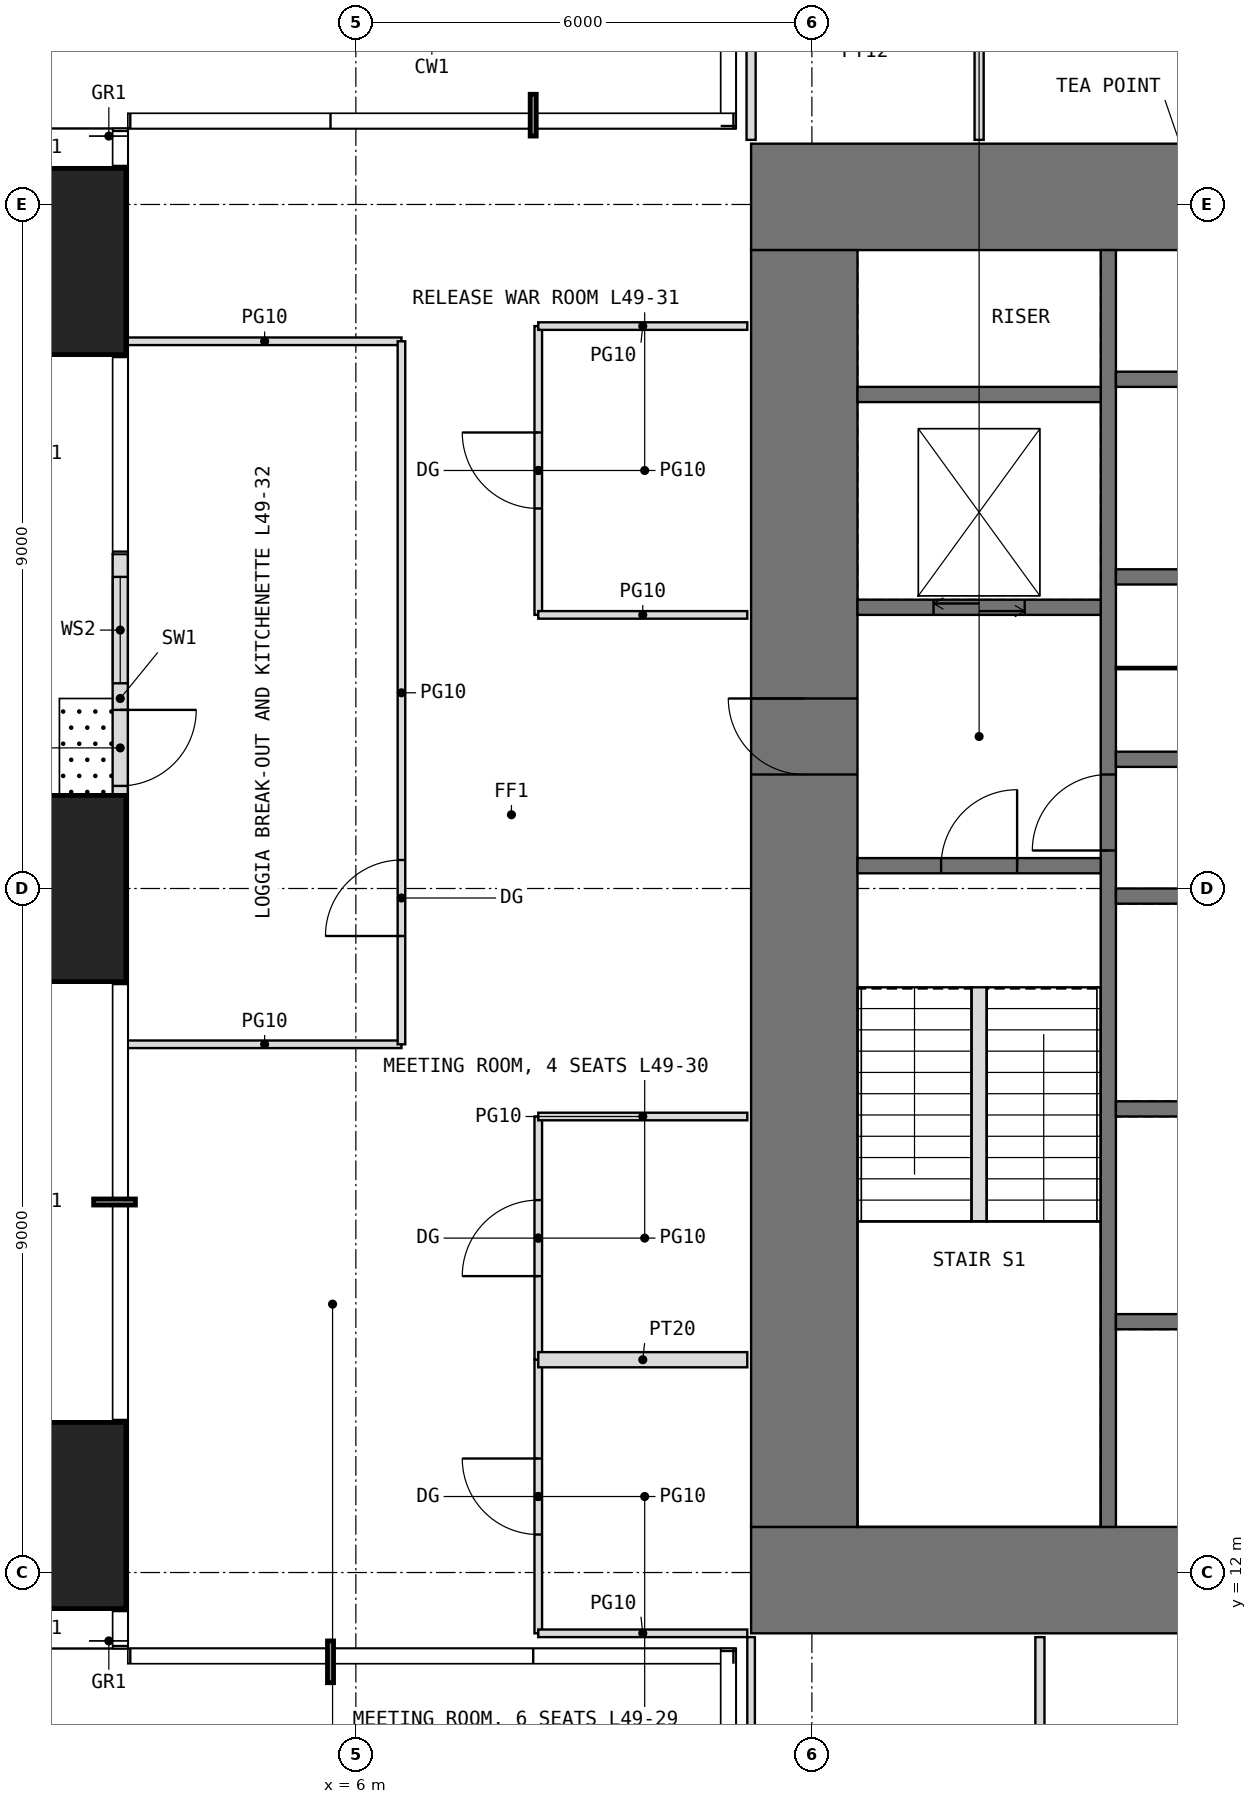
"""IFC4 building model, lengths in metres.
Left out: names, types, materials, properties, quantities, classifications, styles, units other than length and angle.
Written with IfcOpenShell. Run it as: python <this file> out.ifc"""

import sys

from ifc_helpers import new_model, si_unit, direction, frame, frame_2d, origin, origin_2d, place, context, subcontext, project, spatial, rectangle, extrude, element, fill, save


model = new_model("IFC4")
c1 = context("Model", 3, precision=1e-05, world=origin(), true_north=direction((0.0, 1.0)))
c2 = subcontext(c1, "Body", "Model", "MODEL_VIEW")
j1 = project(units=[si_unit("LENGTHUNIT", "METRE"), si_unit("PLANEANGLEUNIT", "RADIAN")], contexts=[c1])
p1 = place(None, origin())
s1 = spatial("IfcSite", under=j1, at=p1, CompositionType="ELEMENT")
p2 = place(p1, origin())
s2 = spatial("IfcBuilding", under=s1, at=p2, CompositionType="ELEMENT")
p3 = place(p2, frame((0.0, 0.0, 206.5)))
s3 = spatial("IfcBuildingStorey", under=s2, at=p3, CompositionType="ELEMENT", Elevation=206.5)
for number, where, z_axis, x_axis in (
    (1, (1.75, 12.75, 0.0), (0.0, 0.0, 1.0), (1.0, 0.0, 0.0)),
    (2, (1.75, 21.0, 0.0), (0.0, 0.0, 1.0), (1.0, 0.0, 0.0)),
    (3, (1.75, 29.25, 0.0), (0.0, 0.0, 1.0), (1.0, 0.0, 0.0)),
):
    element("IfcColumn", number, at=place(p3, frame(where, z_axis=z_axis, x_axis=x_axis)), inside=s3, PredefinedType="COLUMN", context=c2, shape_type="SweptSolid", body=[
        extrude(rectangle(XDim=2.45, YDim=2.45, at=origin_2d()), origin(), (0.0, 0.0, 1.0), 4.0),
    ])
p4 = place(p3, frame((2.9, 25.4, 0.0), z_axis=(0.0, 0.0, 1.0), x_axis=(0.0, -1.0, 0.0)))
e4 = element("IfcWall", 4, at=p4, inside=s3, PredefinedType="USERDEFINED", context=c2, shape_type="SweptSolid", body=[
    extrude(rectangle(XDim=3.8, YDim=0.2, at=frame_2d((1.9, 0.0))), origin(), (0.0, 0.0, 1.0), 3.75),
])
p5 = place(p4, frame((2.05, 0.0, 0.0)))
e5 = element("IfcOpeningElement", 5, at=p5, cuts=e4, PredefinedType="OPENING", context=c2, shape_type="SweptSolid", body=[
    extrude(rectangle(XDim=1.0, YDim=2.4, at=frame_2d((0.5, 1.2))), frame((0.0, 0.11, 0.0), z_axis=(0.0, -1.0, 0.0), x_axis=(1.0, 0.0, 0.0)), (0.0, 0.0, 1.0), 0.22),
])
p6 = place(p4, frame((0.3, 0.0, 0.3)))
e6 = element("IfcOpeningElement", 6, at=p6, cuts=e4, PredefinedType="OPENING", context=c2, shape_type="SweptSolid", body=[
    extrude(rectangle(XDim=1.4, YDim=2.7, at=frame_2d((0.7, 1.35))), frame((0.0, 0.11, 0.0), z_axis=(0.0, -1.0, 0.0), x_axis=(1.0, 0.0, 0.0)), (0.0, 0.0, 1.0), 0.22),
])
p7 = place(p3, frame((11.2, 11.9, -0.05), z_axis=(0.0, 0.0, 1.0), x_axis=(1.0, 0.0, 0.0)))
e7 = element("IfcWall", 7, at=p7, inside=s3, PredefinedType="SHEAR", context=c2, shape_type="SweptSolid", body=[
    extrude(rectangle(XDim=19.6, YDim=1.4, at=frame_2d((9.8, 0.0))), origin(), (0.0, 0.0, 1.0), 4.0),
])
p8 = place(p7, frame((8.8, 0.0, 0.05)))
e8 = element("IfcOpeningElement", 8, at=p8, cuts=e7, PredefinedType="OPENING", context=c2, shape_type="SweptSolid", body=[
    extrude(rectangle(XDim=2.0, YDim=2.2, at=frame_2d((1.0, 1.1))), frame((0.0, 0.71, 0.0), z_axis=(0.0, -1.0, 0.0), x_axis=(1.0, 0.0, 0.0)), (0.0, 0.0, 1.0), 1.42),
])
p9 = place(p3, frame((11.2, 30.1, -0.05), z_axis=(0.0, 0.0, 1.0), x_axis=(1.0, 0.0, 0.0)))
e9 = element("IfcWall", 9, at=p9, inside=s3, PredefinedType="SHEAR", context=c2, shape_type="SweptSolid", body=[
    extrude(rectangle(XDim=19.6, YDim=1.4, at=frame_2d((9.8, 0.0))), origin(), (0.0, 0.0, 1.0), 4.0),
])
p10 = place(p9, frame((8.8, 0.0, 0.05)))
e10 = element("IfcOpeningElement", 10, at=p10, cuts=e9, PredefinedType="OPENING", context=c2, shape_type="SweptSolid", body=[
    extrude(rectangle(XDim=2.0, YDim=2.2, at=frame_2d((1.0, 1.1))), frame((0.0, 0.71, 0.0), z_axis=(0.0, -1.0, 0.0), x_axis=(1.0, 0.0, 0.0)), (0.0, 0.0, 1.0), 1.42),
])
p11 = place(p3, frame((11.9, 12.6, -0.05), z_axis=(0.0, 0.0, 1.0), x_axis=(0.0, 1.0, 0.0)))
e11 = element("IfcWall", 11, at=p11, inside=s3, PredefinedType="SHEAR", context=c2, shape_type="SweptSolid", body=[
    extrude(rectangle(XDim=16.8, YDim=1.4, at=frame_2d((8.4, 0.0))), origin(), (0.0, 0.0, 1.0), 4.0),
])
p12 = place(p11, frame((9.9, 0.0, 0.05)))
e12 = element("IfcOpeningElement", 12, at=p12, cuts=e11, PredefinedType="OPENING", context=c2, shape_type="SweptSolid", body=[
    extrude(rectangle(XDim=1.0, YDim=2.2, at=frame_2d((0.5, 1.1))), frame((0.0, 0.71, 0.0), z_axis=(0.0, -1.0, 0.0), x_axis=(1.0, 0.0, 0.0)), (0.0, 0.0, 1.0), 1.42),
])
p13 = place(p3, frame((15.9, 12.6, -0.05), z_axis=(0.0, 0.0, 1.0), x_axis=(0.0, 1.0, 0.0)))
e13 = element("IfcWall", 13, at=p13, inside=s3, PredefinedType="SHEAR", context=c2, shape_type="SweptSolid", body=[
    extrude(rectangle(XDim=16.8, YDim=0.2, at=frame_2d((8.4, 0.0))), origin(), (0.0, 0.0, 1.0), 4.0),
])
p14 = place(p13, frame((8.9, 0.0, 0.05)))
e14 = element("IfcOpeningElement", 14, at=p14, cuts=e13, PredefinedType="OPENING", context=c2, shape_type="SweptSolid", body=[
    extrude(rectangle(XDim=1.0, YDim=2.2, at=frame_2d((0.5, 1.1))), frame((0.0, 0.11, 0.0), z_axis=(0.0, -1.0, 0.0), x_axis=(1.0, 0.0, 0.0)), (0.0, 0.0, 1.0), 0.22),
])
p15 = place(p3, frame((12.6, 21.3, -0.05), z_axis=(0.0, 0.0, 1.0), x_axis=(1.0, 0.0, 0.0)))
e15 = element("IfcWall", 15, at=p15, inside=s3, PredefinedType="SHEAR", context=c2, shape_type="SweptSolid", body=[
    extrude(rectangle(XDim=3.2, YDim=0.2, at=frame_2d((1.6, 0.0))), origin(), (0.0, 0.0, 1.0), 4.0),
])
p16 = place(p15, frame((1.1, 0.0, 0.05)))
e16 = element("IfcOpeningElement", 16, at=p16, cuts=e15, PredefinedType="OPENING", context=c2, shape_type="SweptSolid", body=[
    extrude(rectangle(XDim=1.0, YDim=2.2, at=frame_2d((0.5, 1.1))), frame((0.0, 0.11, 0.0), z_axis=(0.0, -1.0, 0.0), x_axis=(1.0, 0.0, 0.0)), (0.0, 0.0, 1.0), 0.22),
])
p17 = place(p3, frame((12.6, 24.7, -0.05), z_axis=(0.0, 0.0, 1.0), x_axis=(1.0, 0.0, 0.0)))
e17 = element("IfcWall", 17, at=p17, inside=s3, PredefinedType="SHEAR", context=c2, shape_type="SweptSolid", body=[
    extrude(rectangle(XDim=3.2, YDim=0.2, at=frame_2d((1.6, 0.0))), origin(), (0.0, 0.0, 1.0), 4.0),
])
p18 = place(p17, frame((1.0, 0.0, 0.05)))
e18 = element("IfcOpeningElement", 18, at=p18, cuts=e17, PredefinedType="OPENING", context=c2, shape_type="SweptSolid", body=[
    extrude(rectangle(XDim=1.2, YDim=2.2, at=frame_2d((0.6, 1.1))), frame((0.0, 0.11, 0.0), z_axis=(0.0, -1.0, 0.0), x_axis=(1.0, 0.0, 0.0)), (0.0, 0.0, 1.0), 0.22),
])
for number, where, z_axis, x_axis in (
    (19, (12.6, 27.5, -0.05), (0.0, 0.0, 1.0), (1.0, 0.0, 0.0)),
    (20, (16.0, 15.3, -0.05), (0.0, 0.0, 1.0), (1.0, 0.0, 0.0)),
    (21, (16.0, 18.1, -0.05), (0.0, 0.0, 1.0), (1.0, 0.0, 0.0)),
    (22, (16.0, 20.9, -0.05), (0.0, 0.0, 1.0), (1.0, 0.0, 0.0)),
    (23, (16.0, 22.7, -0.05), (0.0, 0.0, 1.0), (1.0, 0.0, 0.0)),
    (24, (16.0, 25.1, -0.05), (0.0, 0.0, 1.0), (1.0, 0.0, 0.0)),
    (25, (16.0, 27.7, -0.05), (0.0, 0.0, 1.0), (1.0, 0.0, 0.0)),
):
    element("IfcWall", number, at=place(p3, frame(where, z_axis=z_axis, x_axis=x_axis)), inside=s3, PredefinedType="SHEAR", context=c2, shape_type="SweptSolid", body=[
        extrude(rectangle(XDim=3.2, YDim=0.2, at=frame_2d((1.6, 0.0))), origin(), (0.0, 0.0, 1.0), 4.0),
    ])
p19 = place(p3, frame((16.0, 23.9, 0.0), z_axis=(0.0, 0.0, 1.0), x_axis=(1.0, 0.0, 0.0)))
e26 = element("IfcWall", 26, at=p19, inside=s3, PredefinedType="PARTITIONING", context=c2, shape_type="SweptSolid", body=[
    extrude(rectangle(XDim=1.4, YDim=0.03, at=frame_2d((0.7, 0.0))), origin(), (0.0, 0.0, 1.0), 3.75),
])
for number, where, z_axis, x_axis in (
    (27, (3.0, 18.95, 0.0), (0.0, 0.0, 1.0), (1.0, 0.0, 0.0)),
    (28, (3.0, 28.2, 0.0), (0.0, 0.0, 1.0), (1.0, 0.0, 0.0)),
):
    element("IfcWall", number, at=place(p3, frame(where, z_axis=z_axis, x_axis=x_axis)), inside=s3, PredefinedType="PARTITIONING", context=c2, shape_type="SweptSolid", body=[
        extrude(rectangle(XDim=3.6, YDim=0.1, at=frame_2d((1.8, 0.0))), origin(), (0.0, 0.0, 1.0), 3.75),
    ])
p20 = place(p3, frame((6.6, 18.95, 0.0), z_axis=(0.0, 0.0, 1.0), x_axis=(0.0, 1.0, 0.0)))
e29 = element("IfcWall", 29, at=p20, inside=s3, PredefinedType="PARTITIONING", context=c2, shape_type="SweptSolid", body=[
    extrude(rectangle(XDim=9.25, YDim=0.1, at=frame_2d((4.625, 0.0))), origin(), (0.0, 0.0, 1.0), 3.75),
])
p21 = place(p20, frame((1.425, 0.0, 0.0)))
e30 = element("IfcOpeningElement", 30, at=p21, cuts=e29, PredefinedType="OPENING", context=c2, shape_type="SweptSolid", body=[
    extrude(rectangle(XDim=1.0, YDim=2.4, at=frame_2d((0.5, 1.2))), frame((0.0, 0.06, 0.0), z_axis=(0.0, -1.0, 0.0), x_axis=(1.0, 0.0, 0.0)), (0.0, 0.0, 1.0), 0.12),
])
p22 = place(p3, frame((8.4, 11.2, 0.0), z_axis=(0.0, 0.0, 1.0), x_axis=(0.0, 1.0, 0.0)))
e31 = element("IfcWall", 31, at=p22, inside=s3, PredefinedType="PARTITIONING", context=c2, shape_type="SweptSolid", body=[
    extrude(rectangle(XDim=3.6, YDim=0.1, at=frame_2d((1.8, 0.0))), origin(), (0.0, 0.0, 1.0), 3.75),
])
p23 = place(p22, frame((1.3, 0.0, 0.0)))
e32 = element("IfcOpeningElement", 32, at=p23, cuts=e31, PredefinedType="OPENING", context=c2, shape_type="SweptSolid", body=[
    extrude(rectangle(XDim=1.0, YDim=2.4, at=frame_2d((0.5, 1.2))), frame((0.0, 0.06, 0.0), z_axis=(0.0, -1.0, 0.0), x_axis=(1.0, 0.0, 0.0)), (0.0, 0.0, 1.0), 0.12),
])
p24 = place(p3, frame((8.4, 11.2, 0.0), z_axis=(0.0, 0.0, 1.0), x_axis=(1.0, 0.0, 0.0)))
e33 = element("IfcWall", 33, at=p24, inside=s3, PredefinedType="PARTITIONING", context=c2, shape_type="SweptSolid", body=[
    extrude(rectangle(XDim=2.75, YDim=0.1, at=frame_2d((1.375, 0.0))), origin(), (0.0, 0.0, 1.0), 3.75),
])
p25 = place(p3, frame((8.4, 14.8, 0.0), z_axis=(0.0, 0.0, 1.0), x_axis=(0.0, 1.0, 0.0)))
e34 = element("IfcWall", 34, at=p25, inside=s3, PredefinedType="PARTITIONING", context=c2, shape_type="SweptSolid", body=[
    extrude(rectangle(XDim=3.2, YDim=0.1, at=frame_2d((1.6, 0.0))), origin(), (0.0, 0.0, 1.0), 3.75),
])
p26 = place(p25, frame((1.1, 0.0, 0.0)))
e35 = element("IfcOpeningElement", 35, at=p26, cuts=e34, PredefinedType="OPENING", context=c2, shape_type="SweptSolid", body=[
    extrude(rectangle(XDim=1.0, YDim=2.4, at=frame_2d((0.5, 1.2))), frame((0.0, 0.06, 0.0), z_axis=(0.0, -1.0, 0.0), x_axis=(1.0, 0.0, 0.0)), (0.0, 0.0, 1.0), 0.12),
])
p27 = place(p3, frame((8.4, 14.8, 0.0), z_axis=(0.0, 0.0, 1.0), x_axis=(1.0, 0.0, 0.0)))
e36 = element("IfcWall", 36, at=p27, inside=s3, PredefinedType="PARTITIONING", context=c2, shape_type="SweptSolid", body=[
    extrude(rectangle(XDim=2.75, YDim=0.2, at=frame_2d((1.375, 0.0))), origin(), (0.0, 0.0, 1.0), 3.75),
])
p28 = place(p3, frame((8.4, 18.0, 0.0), z_axis=(0.0, 0.0, 1.0), x_axis=(1.0, 0.0, 0.0)))
e37 = element("IfcWall", 37, at=p28, inside=s3, PredefinedType="PARTITIONING", context=c2, shape_type="SweptSolid", body=[
    extrude(rectangle(XDim=2.75, YDim=0.1, at=frame_2d((1.375, 0.0))), origin(), (0.0, 0.0, 1.0), 3.75),
])
p29 = place(p3, frame((8.4, 24.6, 0.0), z_axis=(0.0, 0.0, 1.0), x_axis=(0.0, 1.0, 0.0)))
e38 = element("IfcWall", 38, at=p29, inside=s3, PredefinedType="PARTITIONING", context=c2, shape_type="SweptSolid", body=[
    extrude(rectangle(XDim=3.8, YDim=0.1, at=frame_2d((1.9, 0.0))), origin(), (0.0, 0.0, 1.0), 3.75),
])
p30 = place(p29, frame((1.4, 0.0, 0.0)))
e39 = element("IfcOpeningElement", 39, at=p30, cuts=e38, PredefinedType="OPENING", context=c2, shape_type="SweptSolid", body=[
    extrude(rectangle(XDim=1.0, YDim=2.4, at=frame_2d((0.5, 1.2))), frame((0.0, 0.06, 0.0), z_axis=(0.0, -1.0, 0.0), x_axis=(1.0, 0.0, 0.0)), (0.0, 0.0, 1.0), 0.12),
])
for number, where, z_axis, x_axis in (
    (40, (8.4, 24.6, 0.0), (0.0, 0.0, 1.0), (1.0, 0.0, 0.0)),
    (41, (8.4, 28.4, 0.0), (0.0, 0.0, 1.0), (1.0, 0.0, 0.0)),
):
    element("IfcWall", number, at=place(p3, frame(where, z_axis=z_axis, x_axis=x_axis)), inside=s3, PredefinedType="PARTITIONING", context=c2, shape_type="SweptSolid", body=[
        extrude(rectangle(XDim=2.75, YDim=0.1, at=frame_2d((1.375, 0.0))), origin(), (0.0, 0.0, 1.0), 3.75),
    ])
p31 = place(p3, frame((11.2, 6.8, 0.0), z_axis=(0.0, 0.0, 1.0), x_axis=(0.0, 1.0, 0.0)))
e42 = element("IfcWall", 42, at=p31, inside=s3, PredefinedType="PARTITIONING", context=c2, shape_type="SweptSolid", body=[
    extrude(rectangle(XDim=4.35, YDim=0.1, at=frame_2d((2.175, 0.0))), origin(), (0.0, 0.0, 1.0), 3.75),
])
for number, where, z_axis, x_axis in (
    (43, (11.2, 30.85, 0.0), (0.0, 0.0, 1.0), (0.0, 1.0, 0.0)),
    (44, (14.2, 30.85, 0.0), (0.0, 0.0, 1.0), (0.0, 1.0, 0.0)),
):
    element("IfcWall", number, at=place(p3, frame(where, z_axis=z_axis, x_axis=x_axis)), inside=s3, PredefinedType="PARTITIONING", context=c2, shape_type="SweptSolid", body=[
        extrude(rectangle(XDim=3.05, YDim=0.12, at=frame_2d((1.525, 0.0))), origin(), (0.0, 0.0, 1.0), 3.75),
    ])
p32 = place(p3, frame((15.0, 6.8, 0.0), z_axis=(0.0, 0.0, 1.0), x_axis=(0.0, 1.0, 0.0)))
e45 = element("IfcWall", 45, at=p32, inside=s3, PredefinedType="PARTITIONING", context=c2, shape_type="SweptSolid", body=[
    extrude(rectangle(XDim=4.35, YDim=0.12, at=frame_2d((2.175, 0.0))), origin(), (0.0, 0.0, 1.0), 3.75),
])
p33 = place(p3, frame((14.2, 16.62, 0.0), z_axis=(0.0, 0.0, 1.0), x_axis=(0.0, 1.0, 0.0)))
e46 = element("IfcWall", 46, at=p33, inside=s3, PredefinedType="PARTITIONING", context=c2, shape_type="SweptSolid", body=[
    extrude(rectangle(XDim=3.08, YDim=0.2, at=frame_2d((1.54, 0.0))), origin(), (0.0, 0.0, 1.0), 4.0),
])
p34 = place(p5, origin())
e47 = element("IfcDoor", 47, at=p34, inside=s3, OperationType="SINGLE_SWING_LEFT", PredefinedType="DOOR", context=c2, shape_type="SweptSolid", body=[
    extrude(rectangle(XDim=1.0, YDim=2.4, at=frame_2d((0.5, 1.2))), frame((0.0, 0.025, 0.0), z_axis=(0.0, -1.0, 0.0), x_axis=(1.0, 0.0, 0.0)), (0.0, 0.0, 1.0), 0.05),
])
fill(e5, e47)
p35 = place(p6, origin())
e48 = element("IfcWindow", 48, at=p35, inside=s3, PartitioningType="SINGLE_PANEL", PredefinedType="WINDOW", context=c2, shape_type="SweptSolid", body=[
    extrude(rectangle(XDim=1.4, YDim=2.7, at=frame_2d((0.7, 1.35))), frame((0.0, 0.03, 0.0), z_axis=(0.0, -1.0, 0.0), x_axis=(1.0, 0.0, 0.0)), (0.0, 0.0, 1.0), 0.06),
])
fill(e6, e48)
p36 = place(p12, origin())
e49 = element("IfcDoor", 49, at=p36, inside=s3, OperationType="SINGLE_SWING_RIGHT", PredefinedType="DOOR", context=c2, shape_type="SweptSolid", body=[
    extrude(rectangle(XDim=1.0, YDim=2.2, at=frame_2d((0.5, 1.1))), frame((0.0, 0.025, 0.0), z_axis=(0.0, -1.0, 0.0), x_axis=(1.0, 0.0, 0.0)), (0.0, 0.0, 1.0), 0.05),
])
fill(e12, e49)
p37 = place(p16, origin())
e50 = element("IfcDoor", 50, at=p37, inside=s3, OperationType="SINGLE_SWING_RIGHT", PredefinedType="DOOR", context=c2, shape_type="SweptSolid", body=[
    extrude(rectangle(XDim=1.0, YDim=2.2, at=frame_2d((0.5, 1.1))), frame((0.0, 0.025, 0.0), z_axis=(0.0, -1.0, 0.0), x_axis=(1.0, 0.0, 0.0)), (0.0, 0.0, 1.0), 0.05),
])
fill(e16, e50)
p38 = place(p14, origin())
e51 = element("IfcDoor", 51, at=p38, inside=s3, OperationType="SINGLE_SWING_LEFT", PredefinedType="DOOR", context=c2, shape_type="SweptSolid", body=[
    extrude(rectangle(XDim=1.0, YDim=2.2, at=frame_2d((0.5, 1.1))), frame((0.0, 0.025, 0.0), z_axis=(0.0, -1.0, 0.0), x_axis=(1.0, 0.0, 0.0)), (0.0, 0.0, 1.0), 0.05),
])
fill(e14, e51)
p39 = place(p23, origin())
e52 = element("IfcDoor", 52, at=p39, inside=s3, OperationType="SINGLE_SWING_RIGHT", PredefinedType="DOOR", context=c2, shape_type="SweptSolid", body=[
    extrude(rectangle(XDim=1.0, YDim=2.4, at=frame_2d((0.5, 1.2))), frame((0.0, 0.025, 0.0), z_axis=(0.0, -1.0, 0.0), x_axis=(1.0, 0.0, 0.0)), (0.0, 0.0, 1.0), 0.05),
])
fill(e32, e52)
p40 = place(p26, origin())
e53 = element("IfcDoor", 53, at=p40, inside=s3, OperationType="SINGLE_SWING_LEFT", PredefinedType="DOOR", context=c2, shape_type="SweptSolid", body=[
    extrude(rectangle(XDim=1.0, YDim=2.4, at=frame_2d((0.5, 1.2))), frame((0.0, 0.025, 0.0), z_axis=(0.0, -1.0, 0.0), x_axis=(1.0, 0.0, 0.0)), (0.0, 0.0, 1.0), 0.05),
])
fill(e35, e53)
p41 = place(p30, origin())
e54 = element("IfcDoor", 54, at=p41, inside=s3, OperationType="SINGLE_SWING_RIGHT", PredefinedType="DOOR", context=c2, shape_type="SweptSolid", body=[
    extrude(rectangle(XDim=1.0, YDim=2.4, at=frame_2d((0.5, 1.2))), frame((0.0, 0.025, 0.0), z_axis=(0.0, -1.0, 0.0), x_axis=(1.0, 0.0, 0.0)), (0.0, 0.0, 1.0), 0.05),
])
fill(e39, e54)
p42 = place(p21, origin())
e55 = element("IfcDoor", 55, at=p42, inside=s3, OperationType="SINGLE_SWING_LEFT", PredefinedType="DOOR", context=c2, shape_type="SweptSolid", body=[
    extrude(rectangle(XDim=1.0, YDim=2.4, at=frame_2d((0.5, 1.2))), frame((0.0, 0.025, 0.0), z_axis=(0.0, -1.0, 0.0), x_axis=(1.0, 0.0, 0.0)), (0.0, 0.0, 1.0), 0.05),
])
fill(e30, e55)
p43 = place(p18, origin())
e56 = element("IfcDoor", 56, at=p43, inside=s3, OperationType="DOUBLE_DOOR_SLIDING", PredefinedType="DOOR", context=c2, shape_type="SweptSolid", body=[
    extrude(rectangle(XDim=1.2, YDim=2.2, at=frame_2d((0.6, 1.1))), frame((0.0, 0.025, 0.0), z_axis=(0.0, -1.0, 0.0), x_axis=(1.0, 0.0, 0.0)), (0.0, 0.0, 1.0), 0.05),
])
fill(e18, e56)
save(model, sys.argv[1])
